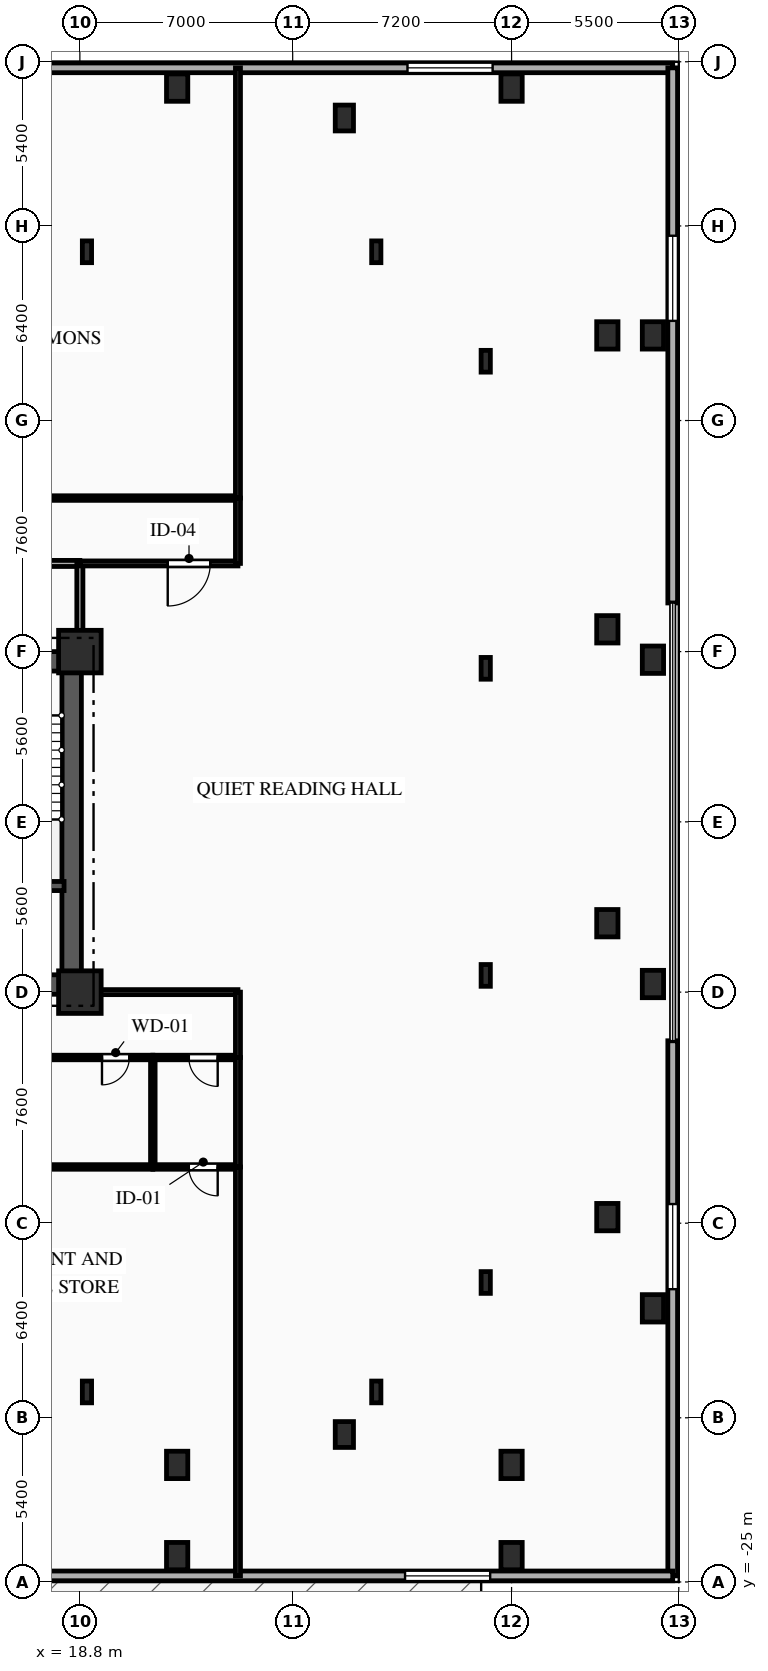
"""IFC4 building model, lengths in metres.
Left out: names, types, materials, properties, quantities, classifications, styles, units other than length and angle.
Written with IfcOpenShell. Run it as: python <this file> out.ifc"""

import sys

from ifc_helpers import new_model, si_unit, direction, frame, frame_2d, origin, origin_2d, place, context, subcontext, project, spatial, rectangle, i_section, extrude, element, fill, save


model = new_model("IFC4")
c1 = context("Model", 3, precision=1e-05, world=origin(), true_north=direction((0.0, 1.0)))
c2 = subcontext(c1, "Body", "Model", "MODEL_VIEW")
j1 = project(units=[si_unit("LENGTHUNIT", "METRE"), si_unit("PLANEANGLEUNIT", "RADIAN")], contexts=[c1])
p1 = place(None, origin())
s1 = spatial("IfcSite", under=j1, at=p1, CompositionType="ELEMENT")
p2 = place(p1, origin())
s2 = spatial("IfcBuilding", under=s1, at=p2, CompositionType="ELEMENT")
p3 = place(p2, frame((0.0, 0.0, 4.5)))
s3 = spatial("IfcBuildingStorey", under=s2, at=p3, CompositionType="ELEMENT", Elevation=4.5)
for number, where, z_axis, x_axis in (
    (1, (18.8, -5.6, 0.0), (0.0, 0.0, 1.0), (1.0, 0.0, 0.0)),
    (2, (18.8, 5.6, 0.0), (0.0, 0.0, 1.0), (1.0, 0.0, 0.0)),
):
    element("IfcColumn", number, at=place(p3, frame(where, z_axis=z_axis, x_axis=x_axis)), inside=s3, PredefinedType="COLUMN", context=c2, shape_type="SweptSolid", body=[
        extrude(rectangle(XDim=1.4, YDim=1.4, at=origin_2d()), origin(), (0.0, 0.0, 1.0), 4.5),
    ])
for number, where, z_axis, x_axis in (
    (3, (22.0, -21.15, 0.0), (0.0, 0.0, 1.0), (1.0, 0.0, 0.0)),
    (4, (33.0, -21.15, 0.0), (0.0, 0.0, 1.0), (1.0, 0.0, 0.0)),
    (5, (22.0, 24.15, 0.0), (0.0, 0.0, 1.0), (1.0, 0.0, 0.0)),
    (6, (33.0, 24.15, 0.0), (0.0, 0.0, 1.0), (1.0, 0.0, 0.0)),
    (7, (36.15, -13.0, 0.0), (0.0, 0.0, 1.0), (1.0, 0.0, 0.0)),
    (8, (36.15, -3.333, 0.0), (0.0, 0.0, 1.0), (1.0, 0.0, 0.0)),
    (9, (36.15, 6.333, 0.0), (0.0, 0.0, 1.0), (1.0, 0.0, 0.0)),
    (10, (36.15, 16.0, 0.0), (0.0, 0.0, 1.0), (1.0, 0.0, 0.0)),
    (11, (22.0, -24.15, 0.0), (0.0, 0.0, 1.0), (1.0, 0.0, 0.0)),
    (12, (33.0, -24.15, 0.0), (0.0, 0.0, 1.0), (1.0, 0.0, 0.0)),
    (13, (37.65, -16.0, 0.0), (0.0, 0.0, 1.0), (1.0, 0.0, 0.0)),
    (14, (37.65, -5.333, 0.0), (0.0, 0.0, 1.0), (1.0, 0.0, 0.0)),
    (15, (37.65, 5.333, 0.0), (0.0, 0.0, 1.0), (1.0, 0.0, 0.0)),
    (16, (37.65, 16.0, 0.0), (0.0, 0.0, 1.0), (1.0, 0.0, 0.0)),
):
    element("IfcColumn", number, at=place(p3, frame(where, z_axis=z_axis, x_axis=x_axis)), inside=s3, PredefinedType="COLUMN", context=c2, shape_type="SweptSolid", body=[
        extrude(rectangle(XDim=0.7, YDim=0.9, at=origin_2d()), origin(), (0.0, 0.0, 1.0), 4.5),
    ])
for number, where, z_axis, x_axis in (
    (17, (27.5, -20.15, 0.0), (0.0, 0.0, 1.0), (1.0, 0.0, 0.0)),
    (18, (27.5, 23.15, 0.0), (0.0, 0.0, 1.0), (1.0, 0.0, 0.0)),
):
    element("IfcColumn", number, at=place(p3, frame(where, z_axis=z_axis, x_axis=x_axis)), inside=s3, PredefinedType="PILASTER", context=c2, shape_type="SweptSolid", body=[
        extrude(rectangle(XDim=0.6, YDim=0.85, at=origin_2d()), origin(), (0.0, 0.0, 1.0), 4.5),
    ])
for number, where, z_axis, x_axis in (
    (19, (19.033, -18.75, 0.0), (0.0, 0.0, 1.0), (1.0, 0.0, 0.0)),
    (20, (28.55, -18.75, 0.0), (0.0, 0.0, 1.0), (1.0, 0.0, 0.0)),
    (21, (28.55, 18.75, 0.0), (0.0, 0.0, 1.0), (1.0, 0.0, 0.0)),
    (22, (19.033, 18.75, 0.0), (0.0, 0.0, 1.0), (1.0, 0.0, 0.0)),
    (23, (32.15, -15.15, 0.0), (0.0, 0.0, 1.0), (1.0, 0.0, 0.0)),
    (24, (32.15, -5.05, 0.0), (0.0, 0.0, 1.0), (1.0, 0.0, 0.0)),
    (25, (32.15, 5.05, 0.0), (0.0, 0.0, 1.0), (1.0, 0.0, 0.0)),
    (26, (32.15, 15.15, 0.0), (0.0, 0.0, 1.0), (1.0, 0.0, 0.0)),
):
    element("IfcColumn", number, at=place(p3, frame(where, z_axis=z_axis, x_axis=x_axis)), inside=s3, PredefinedType="COLUMN", context=c2, shape_type="SweptSolid", body=[
        extrude(i_section(OverallWidth=0.304, OverallDepth=0.716, WebThickness=0.021, FlangeThickness=0.04, FilletRadius=0.027, at=origin_2d()), origin(), (0.0, 0.0, 1.0), 4.5),
    ])
p4 = place(p3, frame((-38.3, 24.8, 0.0), z_axis=(0.0, 0.0, 1.0), x_axis=(1.0, 0.0, 0.0)))
e27 = element("IfcWall", 27, at=p4, inside=s3, PredefinedType="SOLIDWALL", context=c2, shape_type="SweptSolid", body=[
    extrude(rectangle(XDim=76.6, YDim=0.32, at=frame_2d((38.3, 0.0))), origin(), (0.0, 0.0, 1.0), 4.17),
])
p5 = place(p4, frame((6.004, 0.0, 0.85)))
e28 = element("IfcOpeningElement", 28, at=p5, cuts=e27, PredefinedType="OPENING", context=c2, shape_type="SweptSolid", body=[
    extrude(rectangle(XDim=2.8, YDim=2.4, at=frame_2d((1.4, 1.2))), frame((0.0, 0.17, 0.0), z_axis=(0.0, -1.0, 0.0), x_axis=(1.0, 0.0, 0.0)), (0.0, 0.0, 1.0), 0.34),
])
p6 = place(p4, frame((30.291, 0.0, 0.85)))
e29 = element("IfcOpeningElement", 29, at=p6, cuts=e27, PredefinedType="OPENING", context=c2, shape_type="SweptSolid", body=[
    extrude(rectangle(XDim=2.8, YDim=2.4, at=frame_2d((1.4, 1.2))), frame((0.0, 0.17, 0.0), z_axis=(0.0, -1.0, 0.0), x_axis=(1.0, 0.0, 0.0)), (0.0, 0.0, 1.0), 0.34),
])
p7 = place(p4, frame((67.876, 0.0, 0.85)))
e30 = element("IfcOpeningElement", 30, at=p7, cuts=e27, PredefinedType="OPENING", context=c2, shape_type="SweptSolid", body=[
    extrude(rectangle(XDim=2.8, YDim=2.4, at=frame_2d((1.4, 1.2))), frame((0.0, 0.17, 0.0), z_axis=(0.0, -1.0, 0.0), x_axis=(1.0, 0.0, 0.0)), (0.0, 0.0, 1.0), 0.34),
])
p8 = place(p3, frame((38.3, 24.8, 0.0), z_axis=(0.0, 0.0, 1.0), x_axis=(0.0, -1.0, 0.0)))
e31 = element("IfcWall", 31, at=p8, inside=s3, PredefinedType="SOLIDWALL", context=c2, shape_type="SweptSolid", body=[
    extrude(rectangle(XDim=17.6, YDim=0.32, at=frame_2d((8.8, 0.0))), origin(), (0.0, 0.0, 1.0), 4.17),
])
p9 = place(p8, frame((5.522, 0.0, 0.85)))
e32 = element("IfcOpeningElement", 32, at=p9, cuts=e31, PredefinedType="OPENING", context=c2, shape_type="SweptSolid", body=[
    extrude(rectangle(XDim=2.8, YDim=2.4, at=frame_2d((1.4, 1.2))), frame((0.0, 0.17, 0.0), z_axis=(0.0, -1.0, 0.0), x_axis=(1.0, 0.0, 0.0)), (0.0, 0.0, 1.0), 0.34),
])
p10 = place(p3, frame((38.3, -7.2, 0.0), z_axis=(0.0, 0.0, 1.0), x_axis=(0.0, -1.0, 0.0)))
e33 = element("IfcWall", 33, at=p10, inside=s3, PredefinedType="SOLIDWALL", context=c2, shape_type="SweptSolid", body=[
    extrude(rectangle(XDim=17.6, YDim=0.32, at=frame_2d((8.8, 0.0))), origin(), (0.0, 0.0, 1.0), 4.17),
])
p11 = place(p10, frame((5.37, 0.0, 0.85)))
e34 = element("IfcOpeningElement", 34, at=p11, cuts=e33, PredefinedType="OPENING", context=c2, shape_type="SweptSolid", body=[
    extrude(rectangle(XDim=2.8, YDim=2.4, at=frame_2d((1.4, 1.2))), frame((0.0, 0.17, 0.0), z_axis=(0.0, -1.0, 0.0), x_axis=(1.0, 0.0, 0.0)), (0.0, 0.0, 1.0), 0.34),
])
p12 = place(p3, frame((38.3, -24.8, 0.0), z_axis=(0.0, 0.0, 1.0), x_axis=(-1.0, 0.0, 0.0)))
e35 = element("IfcWall", 35, at=p12, inside=s3, PredefinedType="SOLIDWALL", context=c2, shape_type="SweptSolid", body=[
    extrude(rectangle(XDim=76.6, YDim=0.32, at=frame_2d((38.3, 0.0))), origin(), (0.0, 0.0, 1.0), 4.17),
])
p13 = place(p12, frame((6.004, 0.0, 0.85)))
e36 = element("IfcOpeningElement", 36, at=p13, cuts=e35, PredefinedType="OPENING", context=c2, shape_type="SweptSolid", body=[
    extrude(rectangle(XDim=2.8, YDim=2.4, at=frame_2d((1.4, 1.2))), frame((0.0, 0.17, 0.0), z_axis=(0.0, -1.0, 0.0), x_axis=(1.0, 0.0, 0.0)), (0.0, 0.0, 1.0), 0.34),
])
p14 = place(p12, frame((30.697, 0.0, 0.85)))
e37 = element("IfcOpeningElement", 37, at=p14, cuts=e35, PredefinedType="OPENING", context=c2, shape_type="SweptSolid", body=[
    extrude(rectangle(XDim=2.8, YDim=2.4, at=frame_2d((1.4, 1.2))), frame((0.0, 0.17, 0.0), z_axis=(0.0, -1.0, 0.0), x_axis=(1.0, 0.0, 0.0)), (0.0, 0.0, 1.0), 0.34),
])
p15 = place(p12, frame((50.587, 0.0, 0.85)))
e38 = element("IfcOpeningElement", 38, at=p15, cuts=e35, PredefinedType="OPENING", context=c2, shape_type="SweptSolid", body=[
    extrude(rectangle(XDim=2.8, YDim=2.4, at=frame_2d((1.4, 1.2))), frame((0.0, 0.17, 0.0), z_axis=(0.0, -1.0, 0.0), x_axis=(1.0, 0.0, 0.0)), (0.0, 0.0, 1.0), 0.34),
])
p16 = place(p12, frame((67.876, 0.0, 0.85)))
e39 = element("IfcOpeningElement", 39, at=p16, cuts=e35, PredefinedType="OPENING", context=c2, shape_type="SweptSolid", body=[
    extrude(rectangle(XDim=2.8, YDim=2.4, at=frame_2d((1.4, 1.2))), frame((0.0, 0.17, 0.0), z_axis=(0.0, -1.0, 0.0), x_axis=(1.0, 0.0, 0.0)), (0.0, 0.0, 1.0), 0.34),
])
p17 = place(p3, frame((9.2, 5.28, 0.0), z_axis=(0.0, 0.0, 1.0), x_axis=(1.0, 0.0, 0.0)))
e40 = element("IfcWall", 40, at=p17, inside=s3, PredefinedType="SHEAR", context=c2, shape_type="SweptSolid", body=[
    extrude(rectangle(XDim=9.6, YDim=0.64, at=frame_2d((4.8, 0.0))), origin(), (0.0, 0.0, 1.0), 4.17),
])
p18 = place(p17, frame((6.95, 0.0, 0.0)))
e41 = element("IfcOpeningElement", 41, at=p18, cuts=e40, PredefinedType="OPENING", context=c2, shape_type="SweptSolid", body=[
    extrude(rectangle(XDim=1.1, YDim=2.15, at=frame_2d((0.55, 1.075))), frame((0.0, 0.33, 0.0), z_axis=(0.0, -1.0, 0.0), x_axis=(1.0, 0.0, 0.0)), (0.0, 0.0, 1.0), 0.66),
])
p19 = place(p17, frame((3.775, 0.0, 0.0)))
e42 = element("IfcOpeningElement", 42, at=p19, cuts=e40, PredefinedType="OPENING", context=c2, shape_type="SweptSolid", body=[
    extrude(rectangle(XDim=1.05, YDim=2.1, at=frame_2d((0.525, 1.05))), frame((0.0, 0.33, 0.0), z_axis=(0.0, -1.0, 0.0), x_axis=(1.0, 0.0, 0.0)), (0.0, 0.0, 1.0), 0.66),
])
p20 = place(p3, frame((9.2, -5.35, 0.0), z_axis=(0.0, 0.0, 1.0), x_axis=(1.0, 0.0, 0.0)))
e43 = element("IfcWall", 43, at=p20, inside=s3, PredefinedType="SHEAR", context=c2, shape_type="SweptSolid", body=[
    extrude(rectangle(XDim=9.6, YDim=0.64, at=frame_2d((4.8, 0.0))), origin(), (0.0, 0.0, 1.0), 4.17),
])
p21 = place(p20, frame((7.65, 0.0, 0.0)))
e44 = element("IfcOpeningElement", 44, at=p21, cuts=e43, PredefinedType="OPENING", context=c2, shape_type="SweptSolid", body=[
    extrude(rectangle(XDim=0.9, YDim=2.1, at=frame_2d((0.45, 1.05))), frame((0.0, 0.33, 0.0), z_axis=(0.0, -1.0, 0.0), x_axis=(1.0, 0.0, 0.0)), (0.0, 0.0, 1.0), 0.66),
])
p22 = place(p3, frame((18.53, -5.05, 0.0), z_axis=(0.0, 0.0, 1.0), x_axis=(0.0, 1.0, 0.0)))
e45 = element("IfcWall", 45, at=p22, inside=s3, PredefinedType="SHEAR", context=c2, shape_type="SweptSolid", body=[
    extrude(rectangle(XDim=10.1, YDim=0.64, at=frame_2d((5.05, 0.0))), origin(), (0.0, 0.0, 1.0), 4.17),
])
p23 = place(p3, frame((15.1, -2.11, 0.0), z_axis=(0.0, 0.0, 1.0), x_axis=(1.0, 0.0, 0.0)))
e46 = element("IfcWall", 46, at=p23, inside=s3, PredefinedType="SHEAR", context=c2, shape_type="SweptSolid", body=[
    extrude(rectangle(XDim=3.18, YDim=0.3, at=frame_2d((1.59, 0.0))), origin(), (0.0, 0.0, 1.0), 4.17),
])
p24 = place(p3, frame((18.8, 8.5, 0.0), z_axis=(0.0, 0.0, 1.0), x_axis=(-1.0, 0.0, 0.0)))
e47 = element("IfcWall", 47, at=p24, inside=s3, PredefinedType="PARTITIONING", context=c2, shape_type="SweptSolid", body=[
    extrude(rectangle(XDim=6.8, YDim=0.2, at=frame_2d((3.4, 0.0))), origin(), (0.0, 0.0, 1.0), 4.17),
])
p25 = place(p24, frame((3.985, 0.0, 0.0)))
e48 = element("IfcOpeningElement", 48, at=p25, cuts=e47, PredefinedType="OPENING", context=c2, shape_type="SweptSolid", body=[
    extrude(rectangle(XDim=1.1, YDim=2.15, at=frame_2d((0.55, 1.075))), frame((0.0, 0.11, 0.0), z_axis=(0.0, -1.0, 0.0), x_axis=(1.0, 0.0, 0.0)), (0.0, 0.0, 1.0), 0.22),
])
p26 = place(p3, frame((18.8, 5.6, 0.0), z_axis=(0.0, 0.0, 1.0), x_axis=(0.0, 1.0, 0.0)))
e49 = element("IfcWall", 49, at=p26, inside=s3, PredefinedType="PARTITIONING", context=c2, shape_type="SweptSolid", body=[
    extrude(rectangle(XDim=2.9, YDim=0.2, at=frame_2d((1.45, 0.0))), origin(), (0.0, 0.0, 1.0), 3.655),
])
p27 = place(p3, frame((0.0, 10.65, 0.0), z_axis=(0.0, 0.0, 1.0), x_axis=(1.0, 0.0, 0.0)))
e50 = element("IfcWall", 50, at=p27, inside=s3, PredefinedType="PARTITIONING", context=c2, shape_type="SweptSolid", body=[
    extrude(rectangle(XDim=24.0, YDim=0.15, at=frame_2d((12.0, 0.0))), origin(), (0.0, 0.0, 1.0), 4.17),
])
p28 = place(p3, frame((24.0, 8.5, 0.0), z_axis=(0.0, 0.0, 1.0), x_axis=(-1.0, 0.0, 0.0)))
e51 = element("IfcWall", 51, at=p28, inside=s3, PredefinedType="PARTITIONING", context=c2, shape_type="SweptSolid", body=[
    extrude(rectangle(XDim=5.2, YDim=0.165, at=frame_2d((2.6, 0.0))), origin(), (0.0, 0.0, 1.0), 4.17),
])
p29 = place(p28, frame((0.91, 0.0, 0.0)))
e52 = element("IfcOpeningElement", 52, at=p29, cuts=e51, PredefinedType="OPENING", context=c2, shape_type="SweptSolid", body=[
    extrude(rectangle(XDim=1.4, YDim=2.3, at=frame_2d((0.7, 1.15))), frame((0.0, 0.093, 0.0), z_axis=(0.0, -1.0, 0.0), x_axis=(1.0, 0.0, 0.0)), (0.0, 0.0, 1.0), 0.185),
])
p30 = place(p3, frame((24.0, 10.65, 0.0), z_axis=(0.0, 0.0, 1.0), x_axis=(0.0, -1.0, 0.0)))
e53 = element("IfcWall", 53, at=p30, inside=s3, PredefinedType="PARTITIONING", context=c2, shape_type="SweptSolid", body=[
    extrude(rectangle(XDim=2.15, YDim=0.165, at=frame_2d((1.075, 0.0))), origin(), (0.0, 0.0, 1.0), 4.17),
])
p31 = place(p3, frame((21.2, -7.75, 0.0), z_axis=(0.0, 0.0, 1.0), x_axis=(-1.0, 0.0, 0.0)))
e54 = element("IfcWall", 54, at=p31, inside=s3, PredefinedType="PLUMBINGWALL", context=c2, shape_type="SweptSolid", body=[
    extrude(rectangle(XDim=3.6, YDim=0.15, at=frame_2d((1.8, 0.0))), origin(), (0.0, 0.0, 1.0), 4.17),
])
p32 = place(p31, frame((0.772, 0.0, 0.0)))
e55 = element("IfcOpeningElement", 55, at=p32, cuts=e54, PredefinedType="OPENING", context=c2, shape_type="SweptSolid", body=[
    extrude(rectangle(XDim=0.9, YDim=2.1, at=frame_2d((0.45, 1.05))), frame((0.0, 0.085, 0.0), z_axis=(0.0, -1.0, 0.0), x_axis=(1.0, 0.0, 0.0)), (0.0, 0.0, 1.0), 0.17),
])
p33 = place(p3, frame((24.0, -7.75, 0.0), z_axis=(0.0, 0.0, 1.0), x_axis=(-1.0, 0.0, 0.0)))
e56 = element("IfcWall", 56, at=p33, inside=s3, PredefinedType="PARTITIONING", context=c2, shape_type="SweptSolid", body=[
    extrude(rectangle(XDim=2.8, YDim=0.15, at=frame_2d((1.4, 0.0))), origin(), (0.0, 0.0, 1.0), 4.17),
])
p34 = place(p33, frame((0.666, 0.0, 0.0)))
e57 = element("IfcOpeningElement", 57, at=p34, cuts=e56, PredefinedType="OPENING", context=c2, shape_type="SweptSolid", body=[
    extrude(rectangle(XDim=0.95, YDim=2.1, at=frame_2d((0.475, 1.05))), frame((0.0, 0.085, 0.0), z_axis=(0.0, -1.0, 0.0), x_axis=(1.0, 0.0, 0.0)), (0.0, 0.0, 1.0), 0.17),
])
p35 = place(p3, frame((18.8, -5.6, 0.0), z_axis=(0.0, 0.0, 1.0), x_axis=(1.0, 0.0, 0.0)))
e58 = element("IfcWall", 58, at=p35, inside=s3, PredefinedType="PARTITIONING", context=c2, shape_type="SweptSolid", body=[
    extrude(rectangle(XDim=5.2, YDim=0.165, at=frame_2d((2.6, 0.0))), origin(), (0.0, 0.0, 1.0), 4.17),
])
p36 = place(p3, frame((24.0, -5.6, 0.0), z_axis=(0.0, 0.0, 1.0), x_axis=(0.0, -1.0, 0.0)))
e59 = element("IfcWall", 59, at=p36, inside=s3, PredefinedType="PARTITIONING", context=c2, shape_type="SweptSolid", body=[
    extrude(rectangle(XDim=2.15, YDim=0.165, at=frame_2d((1.075, 0.0))), origin(), (0.0, 0.0, 1.0), 4.17),
])
p37 = place(p3, frame((24.0, 24.8, 0.0), z_axis=(0.0, 0.0, 1.0), x_axis=(0.0, -1.0, 0.0)))
e60 = element("IfcWall", 60, at=p37, inside=s3, PredefinedType="PARTITIONING", context=c2, shape_type="SweptSolid", body=[
    extrude(rectangle(XDim=14.15, YDim=0.165, at=frame_2d((7.075, 0.0))), origin(), (0.0, 0.0, 1.0), 4.17),
])
p38 = place(p3, frame((21.2, -7.75, 0.0), z_axis=(0.0, 0.0, 1.0), x_axis=(0.0, -1.0, 0.0)))
e61 = element("IfcWall", 61, at=p38, inside=s3, PredefinedType="PLUMBINGWALL", context=c2, shape_type="SweptSolid", body=[
    extrude(rectangle(XDim=3.6, YDim=0.15, at=frame_2d((1.8, 0.0))), origin(), (0.0, 0.0, 1.0), 4.17),
])
p39 = place(p3, frame((21.2, -11.35, 0.0), z_axis=(0.0, 0.0, 1.0), x_axis=(-1.0, 0.0, 0.0)))
e62 = element("IfcWall", 62, at=p39, inside=s3, PredefinedType="PLUMBINGWALL", context=c2, shape_type="SweptSolid", body=[
    extrude(rectangle(XDim=3.6, YDim=0.15, at=frame_2d((1.8, 0.0))), origin(), (0.0, 0.0, 1.0), 4.17),
])
p40 = place(p3, frame((24.0, -11.35, 0.0), z_axis=(0.0, 0.0, 1.0), x_axis=(-1.0, 0.0, 0.0)))
e63 = element("IfcWall", 63, at=p40, inside=s3, PredefinedType="PARTITIONING", context=c2, shape_type="SweptSolid", body=[
    extrude(rectangle(XDim=2.8, YDim=0.15, at=frame_2d((1.4, 0.0))), origin(), (0.0, 0.0, 1.0), 4.17),
])
p41 = place(p40, frame((0.666, 0.0, 0.0)))
e64 = element("IfcOpeningElement", 64, at=p41, cuts=e63, PredefinedType="OPENING", context=c2, shape_type="SweptSolid", body=[
    extrude(rectangle(XDim=0.95, YDim=2.1, at=frame_2d((0.475, 1.05))), frame((0.0, 0.085, 0.0), z_axis=(0.0, -1.0, 0.0), x_axis=(1.0, 0.0, 0.0)), (0.0, 0.0, 1.0), 0.17),
])
p42 = place(p3, frame((24.0, -7.75, 0.0), z_axis=(0.0, 0.0, 1.0), x_axis=(0.0, -1.0, 0.0)))
e65 = element("IfcWall", 65, at=p42, inside=s3, PredefinedType="PARTITIONING", context=c2, shape_type="SweptSolid", body=[
    extrude(rectangle(XDim=3.6, YDim=0.165, at=frame_2d((1.8, 0.0))), origin(), (0.0, 0.0, 1.0), 4.17),
])
p43 = place(p3, frame((24.0, -11.35, 0.0), z_axis=(0.0, 0.0, 1.0), x_axis=(0.0, -1.0, 0.0)))
e66 = element("IfcWall", 66, at=p43, inside=s3, PredefinedType="PARTITIONING", context=c2, shape_type="SweptSolid", body=[
    extrude(rectangle(XDim=13.45, YDim=0.165, at=frame_2d((6.725, 0.0))), origin(), (0.0, 0.0, 1.0), 4.17),
])
p44 = place(p7, origin())
e67 = element("IfcWindow", 67, at=p44, inside=s3, PartitioningType="SINGLE_PANEL", PredefinedType="WINDOW", context=c2, shape_type="SweptSolid", body=[
    extrude(rectangle(XDim=2.8, YDim=2.4, at=frame_2d((1.4, 1.2))), frame((0.0, 0.03, 0.0), z_axis=(0.0, -1.0, 0.0), x_axis=(1.0, 0.0, 0.0)), (0.0, 0.0, 1.0), 0.06),
])
fill(e30, e67)
p45 = place(p9, origin())
e68 = element("IfcWindow", 68, at=p45, inside=s3, PartitioningType="SINGLE_PANEL", PredefinedType="WINDOW", context=c2, shape_type="SweptSolid", body=[
    extrude(rectangle(XDim=2.8, YDim=2.4, at=frame_2d((1.4, 1.2))), frame((0.0, 0.03, 0.0), z_axis=(0.0, -1.0, 0.0), x_axis=(1.0, 0.0, 0.0)), (0.0, 0.0, 1.0), 0.06),
])
fill(e32, e68)
p46 = place(p11, origin())
e69 = element("IfcWindow", 69, at=p46, inside=s3, PartitioningType="SINGLE_PANEL", PredefinedType="WINDOW", context=c2, shape_type="SweptSolid", body=[
    extrude(rectangle(XDim=2.8, YDim=2.4, at=frame_2d((1.4, 1.2))), frame((0.0, 0.03, 0.0), z_axis=(0.0, -1.0, 0.0), x_axis=(1.0, 0.0, 0.0)), (0.0, 0.0, 1.0), 0.06),
])
fill(e34, e69)
p47 = place(p13, origin())
e70 = element("IfcWindow", 70, at=p47, inside=s3, PartitioningType="SINGLE_PANEL", PredefinedType="WINDOW", context=c2, shape_type="SweptSolid", body=[
    extrude(rectangle(XDim=2.8, YDim=2.4, at=frame_2d((1.4, 1.2))), frame((0.0, 0.03, 0.0), z_axis=(0.0, -1.0, 0.0), x_axis=(1.0, 0.0, 0.0)), (0.0, 0.0, 1.0), 0.06),
])
fill(e36, e70)
p48 = place(p29, origin())
e71 = element("IfcDoor", 71, at=p48, inside=s3, OperationType="SINGLE_SWING_RIGHT", PredefinedType="DOOR", context=c2, shape_type="SweptSolid", body=[
    extrude(rectangle(XDim=1.4, YDim=2.3, at=frame_2d((0.7, 1.15))), frame((0.0, 0.025, 0.0), z_axis=(0.0, -1.0, 0.0), x_axis=(1.0, 0.0, 0.0)), (0.0, 0.0, 1.0), 0.05),
])
fill(e52, e71)
p49 = place(p32, origin())
e72 = element("IfcDoor", 72, at=p49, inside=s3, OperationType="SINGLE_SWING_RIGHT", PredefinedType="DOOR", context=c2, shape_type="SweptSolid", body=[
    extrude(rectangle(XDim=0.9, YDim=2.1, at=frame_2d((0.45, 1.05))), frame((0.0, 0.025, 0.0), z_axis=(0.0, -1.0, 0.0), x_axis=(1.0, 0.0, 0.0)), (0.0, 0.0, 1.0), 0.05),
])
fill(e55, e72)
p50 = place(p34, origin())
e73 = element("IfcDoor", 73, at=p50, inside=s3, OperationType="SINGLE_SWING_LEFT", PredefinedType="DOOR", context=c2, shape_type="SweptSolid", body=[
    extrude(rectangle(XDim=0.95, YDim=2.1, at=frame_2d((0.475, 1.05))), frame((0.0, 0.025, 0.0), z_axis=(0.0, -1.0, 0.0), x_axis=(1.0, 0.0, 0.0)), (0.0, 0.0, 1.0), 0.05),
])
fill(e57, e73)
p51 = place(p41, origin())
e74 = element("IfcDoor", 74, at=p51, inside=s3, OperationType="SINGLE_SWING_LEFT", PredefinedType="DOOR", context=c2, shape_type="SweptSolid", body=[
    extrude(rectangle(XDim=0.95, YDim=2.1, at=frame_2d((0.475, 1.05))), frame((0.0, 0.025, 0.0), z_axis=(0.0, -1.0, 0.0), x_axis=(1.0, 0.0, 0.0)), (0.0, 0.0, 1.0), 0.05),
])
fill(e64, e74)
save(model, sys.argv[1])
